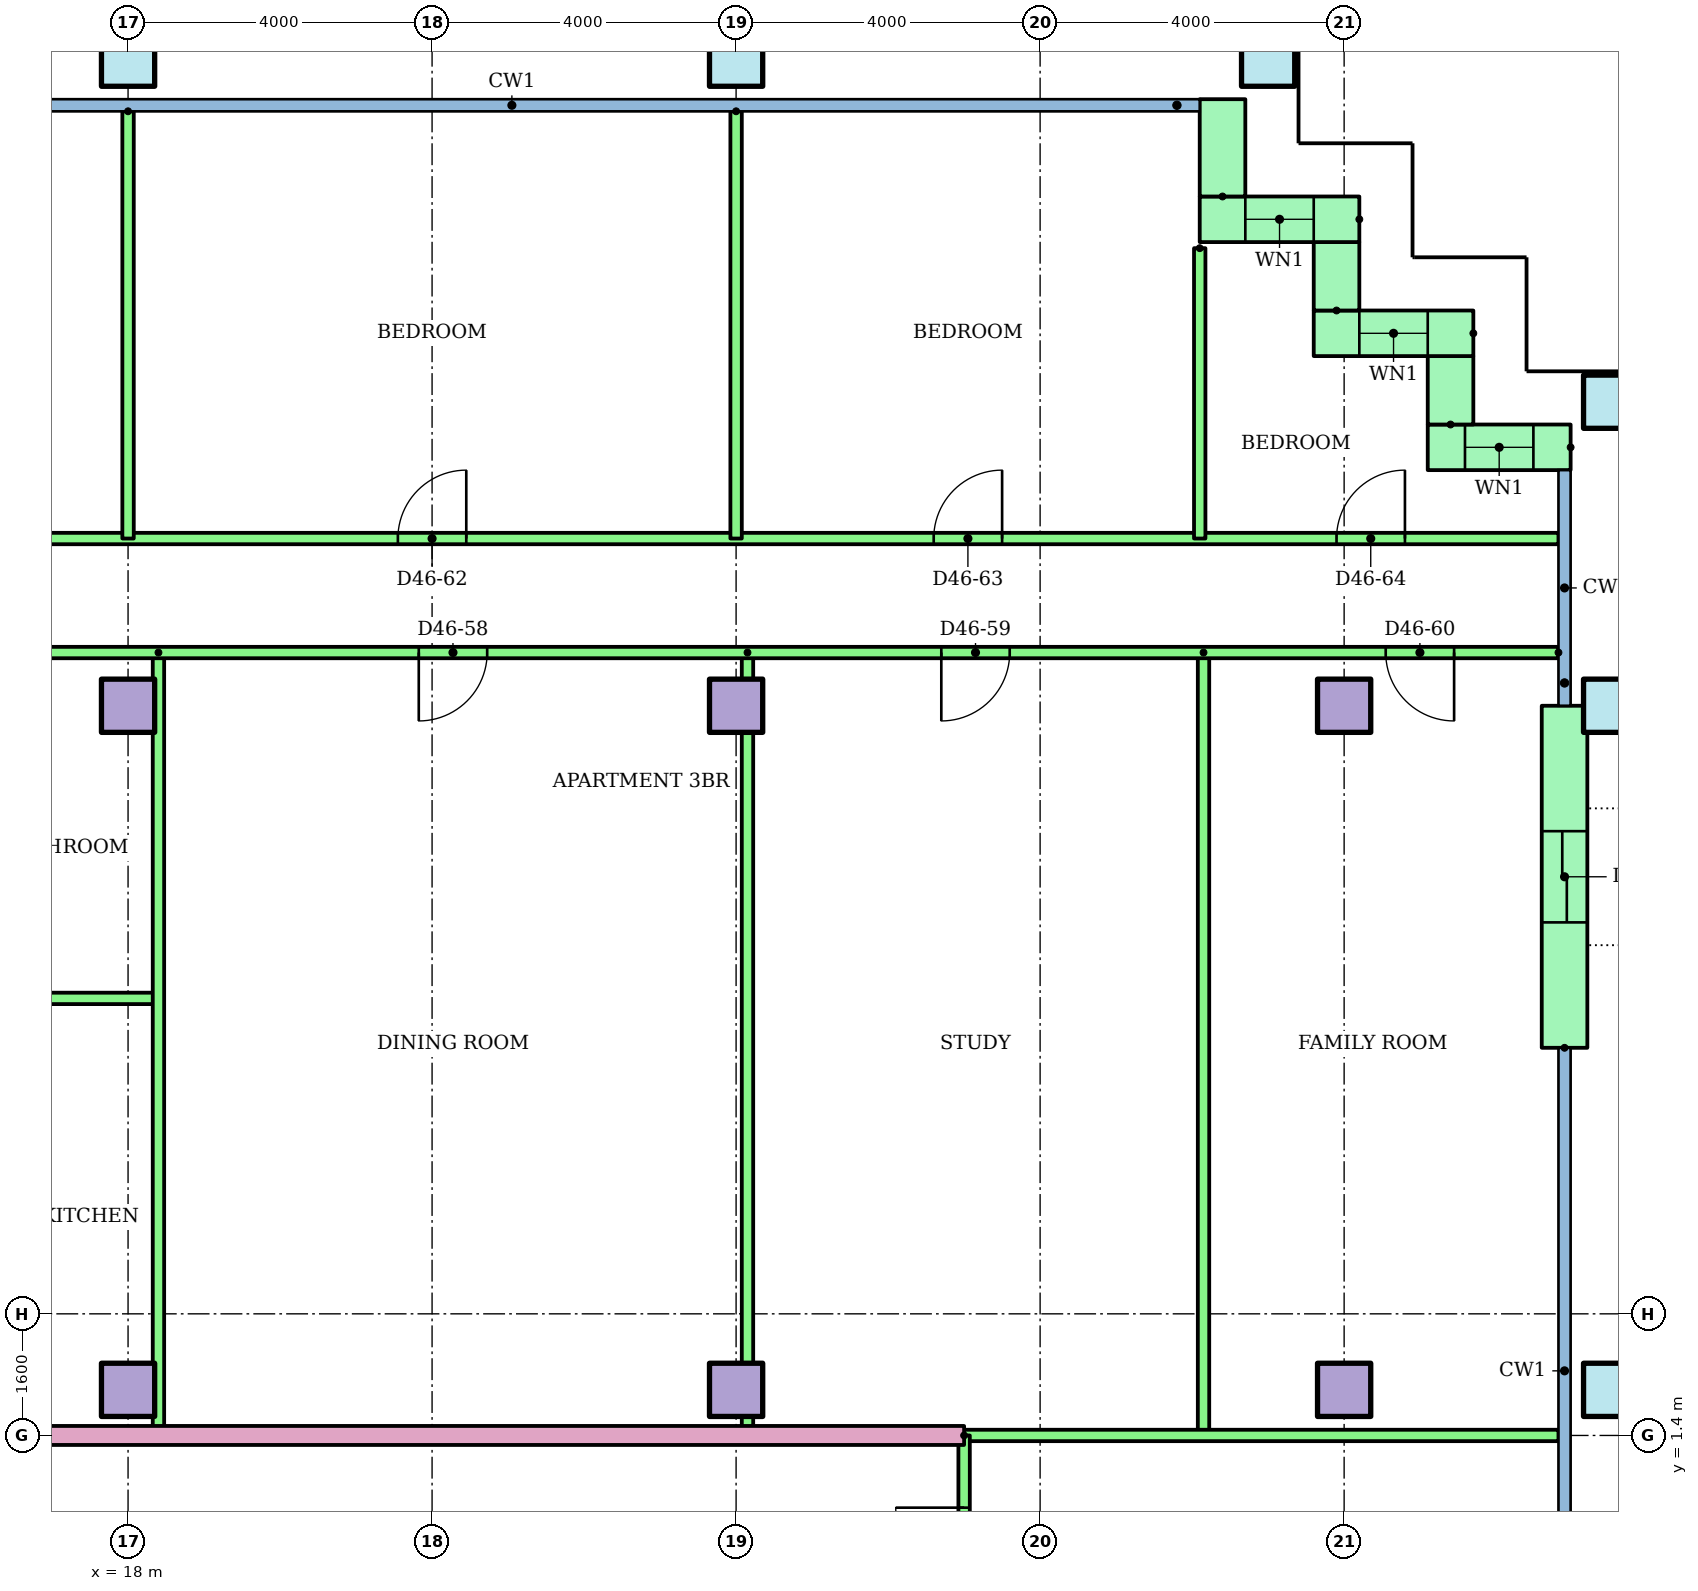
"""IFC4 building model, lengths in metres.
Left out: names, types, materials, properties, quantities, classifications, styles, units other than length and angle.
Written with IfcOpenShell. Run it as: python <this file> out.ifc"""

import sys

from ifc_helpers import new_model, si_unit, direction, frame, frame_2d, origin, origin_2d, place, context, subcontext, project, spatial, rectangle, hollow_rectangle, extrude, element, fill, save


model = new_model("IFC4")
c1 = context("Model", 3, precision=1e-05, world=origin(), true_north=direction((0.0, 1.0)))
c2 = subcontext(c1, "Body", "Model", "MODEL_VIEW")
j1 = project(units=[si_unit("LENGTHUNIT", "METRE"), si_unit("PLANEANGLEUNIT", "RADIAN")], contexts=[c1])
p1 = place(None, origin())
s1 = spatial("IfcSite", under=j1, at=p1, CompositionType="ELEMENT")
p2 = place(p1, origin())
s2 = spatial("IfcBuilding", under=s1, at=p2, CompositionType="ELEMENT")
p3 = place(p2, frame((0.0, 0.0, 178.1)))
s3 = spatial("IfcBuildingStorey", under=s2, at=p3, CompositionType="ELEMENT", Elevation=178.1)
for number, where in (
    (1, (18.0, 2.0, 0.0)),
    (2, (26.0, 2.0, 0.0)),
    (3, (34.0, 2.0, 0.0)),
):
    element("IfcColumn", number, at=place(p3, frame(where)), inside=s3, PredefinedType="COLUMN", context=c2, shape_type="SweptSolid", body=[
        extrude(rectangle(XDim=0.7, YDim=0.7, at=origin_2d()), origin(), (0.0, 0.0, 1.0), 3.2),
    ])
p4 = place(p3, frame((37.5, 2.0, 0.0)))
e4 = element("IfcColumn", 4, at=p4, inside=s3, PredefinedType="COLUMN", context=c2, shape_type="SweptSolid", body=[
    extrude(hollow_rectangle(XDim=0.7, YDim=0.7, WallThickness=0.036, at=origin_2d()), origin(), (0.0, 0.0, 1.0), 3.2),
])
for number, where in (
    (5, (18.0, 11.0, 0.0)),
    (6, (26.0, 11.0, 0.0)),
    (7, (34.0, 11.0, 0.0)),
):
    element("IfcColumn", number, at=place(p3, frame(where)), inside=s3, PredefinedType="COLUMN", context=c2, shape_type="SweptSolid", body=[
        extrude(rectangle(XDim=0.7, YDim=0.7, at=origin_2d()), origin(), (0.0, 0.0, 1.0), 3.2),
    ])
for number, where in (
    (8, (37.5, 11.0, 0.0)),
    (9, (37.5, 15.0, 0.0)),
    (10, (18.0, 19.5, 0.0)),
    (11, (26.0, 19.5, 0.0)),
    (12, (33.0, 19.5, 0.0)),
):
    element("IfcColumn", number, at=place(p3, frame(where)), inside=s3, PredefinedType="COLUMN", context=c2, shape_type="SweptSolid", body=[
        extrude(hollow_rectangle(XDim=0.7, YDim=0.7, WallThickness=0.036, at=origin_2d()), origin(), (0.0, 0.0, 1.0), 3.2),
    ])
p5 = place(p3, frame((36.98, 14.4, 0.0), z_axis=(0.0, 0.0, 1.0), x_axis=(-1.0, 0.0, 0.0)))
e13 = element("IfcWall", 13, at=p5, inside=s3, PredefinedType="STANDARD", context=c2, shape_type="SweptSolid", body=[
    extrude(rectangle(XDim=1.88, YDim=0.6, at=frame_2d((0.94, 0.0))), origin(), (0.0, 0.0, 1.0), 2.92),
])
p6 = place(p5, frame((0.49, 0.0, 0.9)))
e14 = element("IfcOpeningElement", 14, at=p6, cuts=e13, PredefinedType="OPENING", context=c2, shape_type="SweptSolid", body=[
    extrude(rectangle(XDim=0.9, YDim=1.5, at=frame_2d((0.45, 0.75))), frame((0.0, 0.31, 0.0), z_axis=(0.0, -1.0, 0.0), x_axis=(1.0, 0.0, 0.0)), (0.0, 0.0, 1.0), 0.62),
])
p7 = place(p3, frame((35.4, 14.7, 0.0), z_axis=(0.0, 0.0, 1.0), x_axis=(0.0, 1.0, 0.0)))
e15 = element("IfcWall", 15, at=p7, inside=s3, PredefinedType="STANDARD", context=c2, shape_type="SweptSolid", body=[
    extrude(rectangle(XDim=0.9, YDim=0.6, at=frame_2d((0.45, 0.0))), origin(), (0.0, 0.0, 1.0), 2.92),
])
p8 = place(p3, frame((35.7, 15.9, 0.0), z_axis=(0.0, 0.0, 1.0), x_axis=(-1.0, 0.0, 0.0)))
e16 = element("IfcWall", 16, at=p8, inside=s3, PredefinedType="STANDARD", context=c2, shape_type="SweptSolid", body=[
    extrude(rectangle(XDim=2.1, YDim=0.6, at=frame_2d((1.05, 0.0))), origin(), (0.0, 0.0, 1.0), 2.92),
])
p9 = place(p8, frame((0.6, 0.0, 0.9)))
e17 = element("IfcOpeningElement", 17, at=p9, cuts=e16, PredefinedType="OPENING", context=c2, shape_type="SweptSolid", body=[
    extrude(rectangle(XDim=0.9, YDim=1.5, at=frame_2d((0.45, 0.75))), frame((0.0, 0.31, 0.0), z_axis=(0.0, -1.0, 0.0), x_axis=(1.0, 0.0, 0.0)), (0.0, 0.0, 1.0), 0.62),
])
p10 = place(p3, frame((33.9, 16.2, 0.0), z_axis=(0.0, 0.0, 1.0), x_axis=(0.0, 1.0, 0.0)))
e18 = element("IfcWall", 18, at=p10, inside=s3, PredefinedType="STANDARD", context=c2, shape_type="SweptSolid", body=[
    extrude(rectangle(XDim=0.9, YDim=0.6, at=frame_2d((0.45, 0.0))), origin(), (0.0, 0.0, 1.0), 2.92),
])
p11 = place(p3, frame((34.2, 17.4, 0.0), z_axis=(0.0, 0.0, 1.0), x_axis=(-1.0, 0.0, 0.0)))
e19 = element("IfcWall", 19, at=p11, inside=s3, PredefinedType="STANDARD", context=c2, shape_type="SweptSolid", body=[
    extrude(rectangle(XDim=2.1, YDim=0.6, at=frame_2d((1.05, 0.0))), origin(), (0.0, 0.0, 1.0), 2.92),
])
p12 = place(p11, frame((0.6, 0.0, 0.9)))
e20 = element("IfcOpeningElement", 20, at=p12, cuts=e19, PredefinedType="OPENING", context=c2, shape_type="SweptSolid", body=[
    extrude(rectangle(XDim=0.9, YDim=1.5, at=frame_2d((0.45, 0.75))), frame((0.0, 0.31, 0.0), z_axis=(0.0, -1.0, 0.0), x_axis=(1.0, 0.0, 0.0)), (0.0, 0.0, 1.0), 0.62),
])
p13 = place(p3, frame((32.4, 17.7, 0.0), z_axis=(0.0, 0.0, 1.0), x_axis=(0.0, 1.0, 0.0)))
e21 = element("IfcWall", 21, at=p13, inside=s3, PredefinedType="STANDARD", context=c2, shape_type="SweptSolid", body=[
    extrude(rectangle(XDim=1.28, YDim=0.6, at=frame_2d((0.64, 0.0))), origin(), (0.0, 0.0, 1.0), 2.92),
])
p14 = place(p3, frame((36.9, 6.5, 0.0), z_axis=(0.0, 0.0, 1.0), x_axis=(0.0, 1.0, 0.0)))
e22 = element("IfcWall", 22, at=p14, inside=s3, PredefinedType="STANDARD", context=c2, shape_type="SweptSolid", body=[
    extrude(rectangle(XDim=4.5, YDim=0.6, at=frame_2d((2.25, 0.0))), origin(), (0.0, 0.0, 1.0), 2.92),
])
p15 = place(p14, frame((1.65, 0.0, 0.0)))
e23 = element("IfcOpeningElement", 23, at=p15, cuts=e22, PredefinedType="OPENING", context=c2, shape_type="SweptSolid", body=[
    extrude(rectangle(XDim=1.2, YDim=2.1, at=frame_2d((0.6, 1.05))), frame((0.0, 0.31, 0.0), z_axis=(0.0, -1.0, 0.0), x_axis=(1.0, 0.0, 0.0)), (0.0, 0.0, 1.0), 0.62),
])
p16 = place(p3, frame((16.0, 7.15, 0.0)))
e24 = element("IfcWall", 24, at=p16, inside=s3, PredefinedType="PARTITIONING", context=c2, shape_type="SweptSolid", body=[
    extrude(rectangle(XDim=2.4, YDim=0.15, at=frame_2d((1.2, 0.0))), origin(), (0.0, 0.0, 1.0), 2.4),
])
for number, where, z_axis, x_axis in (
    (25, (18.4, 11.7, 0.0), (0.0, 0.0, 1.0), (0.0, -1.0, 0.0)),
    (26, (26.15, 11.7, 0.0), (0.0, 0.0, 1.0), (0.0, -1.0, 0.0)),
    (27, (32.15, 11.7, 0.0), (0.0, 0.0, 1.0), (0.0, -1.0, 0.0)),
):
    element("IfcWall", number, at=place(p3, frame(where, z_axis=z_axis, x_axis=x_axis)), inside=s3, PredefinedType="PARTITIONING", context=c2, shape_type="SweptSolid", body=[
        extrude(rectangle(XDim=10.3, YDim=0.15, at=frame_2d((5.15, 0.0))), origin(), (0.0, 0.0, 1.0), 2.4),
    ])
p17 = place(p3, frame((36.82, 11.7, 0.0), z_axis=(0.0, 0.0, 1.0), x_axis=(-1.0, 0.0, 0.0)))
e28 = element("IfcWall", 28, at=p17, inside=s3, PredefinedType="PARTITIONING", context=c2, shape_type="SweptSolid", body=[
    extrude(rectangle(XDim=20.82, YDim=0.15, at=frame_2d((10.41, 0.0))), origin(), (0.0, 0.0, 1.0), 2.4),
])
p18 = place(p17, frame((14.095, 0.0, 0.0)))
e29 = element("IfcOpeningElement", 29, at=p18, cuts=e28, PredefinedType="OPENING", context=c2, shape_type="SweptSolid", body=[
    extrude(rectangle(XDim=0.9, YDim=2.1, at=frame_2d((0.45, 1.05))), frame((0.0, 0.085, 0.0), z_axis=(0.0, -1.0, 0.0), x_axis=(1.0, 0.0, 0.0)), (0.0, 0.0, 1.0), 0.17),
])
p19 = place(p17, frame((7.22, 0.0, 0.0)))
e30 = element("IfcOpeningElement", 30, at=p19, cuts=e28, PredefinedType="OPENING", context=c2, shape_type="SweptSolid", body=[
    extrude(rectangle(XDim=0.9, YDim=2.1, at=frame_2d((0.45, 1.05))), frame((0.0, 0.085, 0.0), z_axis=(0.0, -1.0, 0.0), x_axis=(1.0, 0.0, 0.0)), (0.0, 0.0, 1.0), 0.17),
])
p20 = place(p17, frame((1.373, 0.0, 0.0)))
e31 = element("IfcOpeningElement", 31, at=p20, cuts=e28, PredefinedType="OPENING", context=c2, shape_type="SweptSolid", body=[
    extrude(rectangle(XDim=0.9, YDim=2.1, at=frame_2d((0.45, 1.05))), frame((0.0, 0.085, 0.0), z_axis=(0.0, -1.0, 0.0), x_axis=(1.0, 0.0, 0.0)), (0.0, 0.0, 1.0), 0.17),
])
p21 = place(p3, frame((14.0, 13.2, 0.0)))
e32 = element("IfcWall", 32, at=p21, inside=s3, PredefinedType="PARTITIONING", context=c2, shape_type="SweptSolid", body=[
    extrude(rectangle(XDim=22.82, YDim=0.15, at=frame_2d((11.41, 0.0))), origin(), (0.0, 0.0, 1.0), 2.4),
])
p22 = place(p21, frame((1.5, 0.0, 0.0)))
e33 = element("IfcOpeningElement", 33, at=p22, cuts=e32, PredefinedType="OPENING", context=c2, shape_type="SweptSolid", body=[
    extrude(rectangle(XDim=1.0, YDim=2.1, at=frame_2d((0.5, 1.05))), frame((0.0, 0.085, 0.0), z_axis=(0.0, -1.0, 0.0), x_axis=(1.0, 0.0, 0.0)), (0.0, 0.0, 1.0), 0.17),
])
p23 = place(p21, frame((7.55, 0.0, 0.0)))
e34 = element("IfcOpeningElement", 34, at=p23, cuts=e32, PredefinedType="OPENING", context=c2, shape_type="SweptSolid", body=[
    extrude(rectangle(XDim=0.9, YDim=2.1, at=frame_2d((0.45, 1.05))), frame((0.0, 0.085, 0.0), z_axis=(0.0, -1.0, 0.0), x_axis=(1.0, 0.0, 0.0)), (0.0, 0.0, 1.0), 0.17),
])
p24 = place(p21, frame((14.6, 0.0, 0.0)))
e35 = element("IfcOpeningElement", 35, at=p24, cuts=e32, PredefinedType="OPENING", context=c2, shape_type="SweptSolid", body=[
    extrude(rectangle(XDim=0.9, YDim=2.1, at=frame_2d((0.45, 1.05))), frame((0.0, 0.085, 0.0), z_axis=(0.0, -1.0, 0.0), x_axis=(1.0, 0.0, 0.0)), (0.0, 0.0, 1.0), 0.17),
])
p25 = place(p21, frame((19.9, 0.0, 0.0)))
e36 = element("IfcOpeningElement", 36, at=p25, cuts=e32, PredefinedType="OPENING", context=c2, shape_type="SweptSolid", body=[
    extrude(rectangle(XDim=0.9, YDim=2.1, at=frame_2d((0.45, 1.05))), frame((0.0, 0.085, 0.0), z_axis=(0.0, -1.0, 0.0), x_axis=(1.0, 0.0, 0.0)), (0.0, 0.0, 1.0), 0.17),
])
for number, where, z_axis, x_axis in (
    (37, (18.0, 18.821, 0.0), (0.0, 0.0, 1.0), (0.0, -1.0, 0.0)),
    (38, (26.0, 18.821, 0.0), (0.0, 0.0, 1.0), (0.0, -1.0, 0.0)),
):
    element("IfcWall", number, at=place(p3, frame(where, z_axis=z_axis, x_axis=x_axis)), inside=s3, PredefinedType="PARTITIONING", context=c2, shape_type="SweptSolid", body=[
        extrude(rectangle(XDim=5.621, YDim=0.15, at=frame_2d((2.811, 0.0))), origin(), (0.0, 0.0, 1.0), 2.4),
    ])
p26 = place(p3, frame((32.1, 17.02, 0.0), z_axis=(0.0, 0.0, 1.0), x_axis=(0.0, -1.0, 0.0)))
e39 = element("IfcWall", 39, at=p26, inside=s3, PredefinedType="PARTITIONING", context=c2, shape_type="SweptSolid", body=[
    extrude(rectangle(XDim=3.82, YDim=0.15, at=frame_2d((1.91, 0.0))), origin(), (0.0, 0.0, 1.0), 2.4),
])
p27 = place(p3, frame((14.0, 1.4, 0.0)))
e40 = element("IfcWall", 40, at=p27, inside=s3, PredefinedType="PARTITIONING", context=c2, shape_type="SweptSolid", body=[
    extrude(rectangle(XDim=15.0, YDim=0.25, at=frame_2d((7.5, 0.0))), origin(), (0.0, 0.0, 1.0), 2.4),
])
p28 = place(p27, frame((0.5, 0.0, 0.0)))
e41 = element("IfcOpeningElement", 41, at=p28, cuts=e40, PredefinedType="OPENING", context=c2, shape_type="SweptSolid", body=[
    extrude(rectangle(XDim=1.0, YDim=2.1, at=frame_2d((0.5, 1.05))), frame((0.0, 0.135, 0.0), z_axis=(0.0, -1.0, 0.0), x_axis=(1.0, 0.0, 0.0)), (0.0, 0.0, 1.0), 0.27),
])
p29 = place(p3, frame((29.0, 1.4, 0.0)))
e42 = element("IfcWall", 42, at=p29, inside=s3, PredefinedType="PARTITIONING", context=c2, shape_type="SweptSolid", body=[
    extrude(rectangle(XDim=7.82, YDim=0.15, at=frame_2d((3.91, 0.0))), origin(), (0.0, 0.0, 1.0), 2.4),
])
p30 = place(p3, frame((29.0, -1.4, 0.0), z_axis=(0.0, 0.0, 1.0), x_axis=(0.0, 1.0, 0.0)))
e43 = element("IfcWall", 43, at=p30, inside=s3, PredefinedType="PARTITIONING", context=c2, shape_type="SweptSolid", body=[
    extrude(rectangle(XDim=2.8, YDim=0.15, at=frame_2d((1.4, 0.0))), origin(), (0.0, 0.0, 1.0), 2.4),
])
p31 = place(p30, frame((0.95, 0.0, 0.0)))
e44 = element("IfcOpeningElement", 44, at=p31, cuts=e43, PredefinedType="OPENING", context=c2, shape_type="SweptSolid", body=[
    extrude(rectangle(XDim=0.9, YDim=2.1, at=frame_2d((0.45, 1.05))), frame((0.0, 0.085, 0.0), z_axis=(0.0, -1.0, 0.0), x_axis=(1.0, 0.0, 0.0)), (0.0, 0.0, 1.0), 0.17),
])
p32 = place(p6, origin())
e45 = element("IfcWindow", 45, at=p32, inside=s3, PartitioningType="SINGLE_PANEL", PredefinedType="WINDOW", context=c2, shape_type="SweptSolid", body=[
    extrude(rectangle(XDim=0.9, YDim=1.5, at=frame_2d((0.45, 0.75))), frame((0.0, 0.03, 0.0), z_axis=(0.0, -1.0, 0.0), x_axis=(1.0, 0.0, 0.0)), (0.0, 0.0, 1.0), 0.06),
])
fill(e14, e45)
p33 = place(p9, origin())
e46 = element("IfcWindow", 46, at=p33, inside=s3, PartitioningType="SINGLE_PANEL", PredefinedType="WINDOW", context=c2, shape_type="SweptSolid", body=[
    extrude(rectangle(XDim=0.9, YDim=1.5, at=frame_2d((0.45, 0.75))), frame((0.0, 0.03, 0.0), z_axis=(0.0, -1.0, 0.0), x_axis=(1.0, 0.0, 0.0)), (0.0, 0.0, 1.0), 0.06),
])
fill(e17, e46)
p34 = place(p12, origin())
e47 = element("IfcWindow", 47, at=p34, inside=s3, PartitioningType="SINGLE_PANEL", PredefinedType="WINDOW", context=c2, shape_type="SweptSolid", body=[
    extrude(rectangle(XDim=0.9, YDim=1.5, at=frame_2d((0.45, 0.75))), frame((0.0, 0.03, 0.0), z_axis=(0.0, -1.0, 0.0), x_axis=(1.0, 0.0, 0.0)), (0.0, 0.0, 1.0), 0.06),
])
fill(e20, e47)
p35 = place(p18, origin())
e48 = element("IfcDoor", 48, at=p35, inside=s3, OperationType="SINGLE_SWING_RIGHT", PredefinedType="DOOR", context=c2, shape_type="SweptSolid", body=[
    extrude(rectangle(XDim=0.9, YDim=2.1, at=frame_2d((0.45, 1.05))), frame((0.0, 0.025, 0.0), z_axis=(0.0, -1.0, 0.0), x_axis=(1.0, 0.0, 0.0)), (0.0, 0.0, 1.0), 0.05),
])
fill(e29, e48)
p36 = place(p19, origin())
e49 = element("IfcDoor", 49, at=p36, inside=s3, OperationType="SINGLE_SWING_RIGHT", PredefinedType="DOOR", context=c2, shape_type="SweptSolid", body=[
    extrude(rectangle(XDim=0.9, YDim=2.1, at=frame_2d((0.45, 1.05))), frame((0.0, 0.025, 0.0), z_axis=(0.0, -1.0, 0.0), x_axis=(1.0, 0.0, 0.0)), (0.0, 0.0, 1.0), 0.05),
])
fill(e30, e49)
p37 = place(p20, origin())
e50 = element("IfcDoor", 50, at=p37, inside=s3, OperationType="SINGLE_SWING_LEFT", PredefinedType="DOOR", context=c2, shape_type="SweptSolid", body=[
    extrude(rectangle(XDim=0.9, YDim=2.1, at=frame_2d((0.45, 1.05))), frame((0.0, 0.025, 0.0), z_axis=(0.0, -1.0, 0.0), x_axis=(1.0, 0.0, 0.0)), (0.0, 0.0, 1.0), 0.05),
])
fill(e31, e50)
p38 = place(p23, origin())
e51 = element("IfcDoor", 51, at=p38, inside=s3, OperationType="SINGLE_SWING_RIGHT", PredefinedType="DOOR", context=c2, shape_type="SweptSolid", body=[
    extrude(rectangle(XDim=0.9, YDim=2.1, at=frame_2d((0.45, 1.05))), frame((0.0, 0.025, 0.0), z_axis=(0.0, -1.0, 0.0), x_axis=(1.0, 0.0, 0.0)), (0.0, 0.0, 1.0), 0.05),
])
fill(e34, e51)
p39 = place(p24, origin())
e52 = element("IfcDoor", 52, at=p39, inside=s3, OperationType="SINGLE_SWING_RIGHT", PredefinedType="DOOR", context=c2, shape_type="SweptSolid", body=[
    extrude(rectangle(XDim=0.9, YDim=2.1, at=frame_2d((0.45, 1.05))), frame((0.0, 0.025, 0.0), z_axis=(0.0, -1.0, 0.0), x_axis=(1.0, 0.0, 0.0)), (0.0, 0.0, 1.0), 0.05),
])
fill(e35, e52)
p40 = place(p25, origin())
e53 = element("IfcDoor", 53, at=p40, inside=s3, OperationType="SINGLE_SWING_RIGHT", PredefinedType="DOOR", context=c2, shape_type="SweptSolid", body=[
    extrude(rectangle(XDim=0.9, YDim=2.1, at=frame_2d((0.45, 1.05))), frame((0.0, 0.025, 0.0), z_axis=(0.0, -1.0, 0.0), x_axis=(1.0, 0.0, 0.0)), (0.0, 0.0, 1.0), 0.05),
])
fill(e36, e53)
p41 = place(p31, origin())
e54 = element("IfcDoor", 54, at=p41, inside=s3, OperationType="SINGLE_SWING_RIGHT", PredefinedType="DOOR", context=c2, shape_type="SweptSolid", body=[
    extrude(rectangle(XDim=0.9, YDim=2.1, at=frame_2d((0.45, 1.05))), frame((0.0, 0.025, 0.0), z_axis=(0.0, -1.0, 0.0), x_axis=(1.0, 0.0, 0.0)), (0.0, 0.0, 1.0), 0.05),
])
fill(e44, e54)
p42 = place(p15, origin())
e55 = element("IfcDoor", 55, at=p42, inside=s3, OperationType="SLIDING_TO_LEFT", PredefinedType="DOOR", context=c2, shape_type="SweptSolid", body=[
    extrude(rectangle(XDim=1.2, YDim=2.1, at=frame_2d((0.6, 1.05))), frame((0.0, 0.025, 0.0), z_axis=(0.0, -1.0, 0.0), x_axis=(1.0, 0.0, 0.0)), (0.0, 0.0, 1.0), 0.05),
])
fill(e23, e55)
save(model, sys.argv[1])
